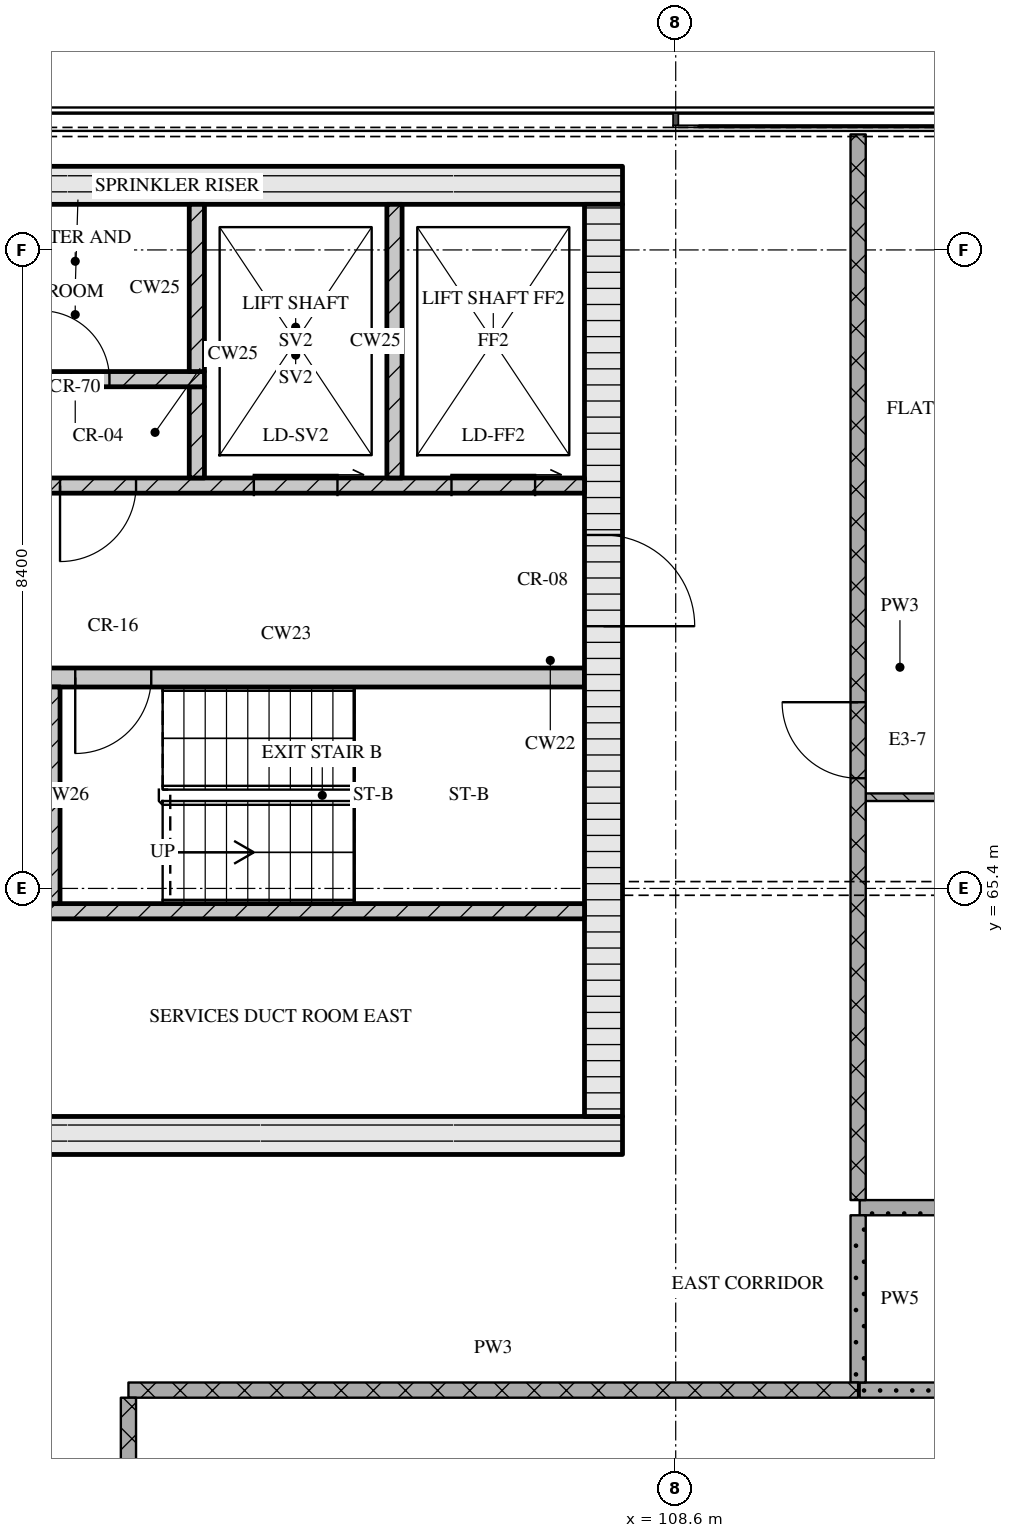
"""IFC4 building model, lengths in metres.
Left out: names, types, materials, properties, quantities, classifications, styles, units other than length and angle.
Written with IfcOpenShell. Run it as: python <this file> out.ifc"""

import sys

from ifc_helpers import new_model, si_unit, direction, frame, frame_2d, origin, place, context, subcontext, project, spatial, rectangle, extrude, element, fill, save


model = new_model("IFC4")
c1 = context("Model", 3, precision=1e-05, world=origin(), true_north=direction((0.0, 1.0)))
c2 = subcontext(c1, "Body", "Model", "MODEL_VIEW")
j1 = project(units=[si_unit("LENGTHUNIT", "METRE"), si_unit("PLANEANGLEUNIT", "RADIAN")], contexts=[c1])
p1 = place(None, origin())
s1 = spatial("IfcSite", under=j1, at=p1, CompositionType="ELEMENT")
p2 = place(p1, origin())
s2 = spatial("IfcBuilding", under=s1, at=p2, CompositionType="ELEMENT")
p3 = place(p2, frame((0.0, 0.0, 281.55)))
s3 = spatial("IfcBuildingStorey", under=s2, at=p3, CompositionType="ELEMENT", Elevation=281.55)
p4 = place(p3, frame((67.3, 62.15, 0.0), z_axis=(0.0, 0.0, 1.0), x_axis=(1.0, 0.0, 0.0)))
e1 = element("IfcWall", 1, at=p4, inside=s3, PredefinedType="SOLIDWALL", context=c2, shape_type="SweptSolid", body=[
    extrude(rectangle(XDim=40.6, YDim=0.5, at=frame_2d((20.3, 0.0))), origin(), (0.0, 0.0, 1.0), 3.32),
])
p5 = place(p4, frame((20.65, 0.0, 0.0)))
e2 = element("IfcOpeningElement", 2, at=p5, cuts=e1, PredefinedType="OPENING", context=c2, shape_type="SweptSolid", body=[
    extrude(rectangle(XDim=1.8, YDim=2.1, at=frame_2d((0.9, 1.05))), frame((0.0, 0.26, 0.0), z_axis=(0.0, -1.0, 0.0), x_axis=(1.0, 0.0, 0.0)), (0.0, 0.0, 1.0), 0.52),
])
p6 = place(p3, frame((67.3, 74.65, 0.0), z_axis=(0.0, 0.0, 1.0), x_axis=(1.0, 0.0, 0.0)))
e3 = element("IfcWall", 3, at=p6, inside=s3, PredefinedType="SOLIDWALL", context=c2, shape_type="SweptSolid", body=[
    extrude(rectangle(XDim=40.6, YDim=0.5, at=frame_2d((20.3, 0.0))), origin(), (0.0, 0.0, 1.0), 3.32),
])
p7 = place(p3, frame((107.65, 62.4, 0.0), z_axis=(0.0, 0.0, 1.0), x_axis=(0.0, 1.0, 0.0)))
e4 = element("IfcWall", 4, at=p7, inside=s3, PredefinedType="SOLIDWALL", context=c2, shape_type="SweptSolid", body=[
    extrude(rectangle(XDim=12.0, YDim=0.5, at=frame_2d((6.0, 0.0))), origin(), (0.0, 0.0, 1.0), 3.32),
])
p8 = place(p7, frame((6.45, 0.0, 0.0)))
e5 = element("IfcOpeningElement", 5, at=p8, cuts=e4, PredefinedType="OPENING", context=c2, shape_type="SweptSolid", body=[
    extrude(rectangle(XDim=1.2, YDim=2.1, at=frame_2d((0.6, 1.05))), frame((0.0, 0.26, 0.0), z_axis=(0.0, -1.0, 0.0), x_axis=(1.0, 0.0, 0.0)), (0.0, 0.0, 1.0), 0.52),
])
p9 = place(p3, frame((91.4, 65.1, 0.0), z_axis=(0.0, 0.0, 1.0), x_axis=(1.0, 0.0, 0.0)))
e6 = element("IfcWall", 6, at=p9, inside=s3, PredefinedType="SOLIDWALL", context=c2, shape_type="SweptSolid", body=[
    extrude(rectangle(XDim=16.0, YDim=0.2, at=frame_2d((8.0, 0.0))), origin(), (0.0, 0.0, 1.0), 3.32),
])
p10 = place(p9, frame((0.85, 0.0, 0.0)))
e7 = element("IfcOpeningElement", 7, at=p10, cuts=e6, PredefinedType="OPENING", context=c2, shape_type="SweptSolid", body=[
    extrude(rectangle(XDim=1.1, YDim=2.1, at=frame_2d((0.55, 1.05))), frame((0.0, 0.11, 0.0), z_axis=(0.0, -1.0, 0.0), x_axis=(1.0, 0.0, 0.0)), (0.0, 0.0, 1.0), 0.22),
])
p11 = place(p9, frame((3.35, 0.0, 0.0)))
e8 = element("IfcOpeningElement", 8, at=p11, cuts=e6, PredefinedType="OPENING", context=c2, shape_type="SweptSolid", body=[
    extrude(rectangle(XDim=1.1, YDim=2.1, at=frame_2d((0.55, 1.05))), frame((0.0, 0.11, 0.0), z_axis=(0.0, -1.0, 0.0), x_axis=(1.0, 0.0, 0.0)), (0.0, 0.0, 1.0), 0.22),
])
p12 = place(p9, frame((5.85, 0.0, 0.0)))
e9 = element("IfcOpeningElement", 9, at=p12, cuts=e6, PredefinedType="OPENING", context=c2, shape_type="SweptSolid", body=[
    extrude(rectangle(XDim=1.1, YDim=2.1, at=frame_2d((0.55, 1.05))), frame((0.0, 0.11, 0.0), z_axis=(0.0, -1.0, 0.0), x_axis=(1.0, 0.0, 0.0)), (0.0, 0.0, 1.0), 0.22),
])
p13 = place(p9, frame((7.83, 0.0, 0.0)))
e10 = element("IfcOpeningElement", 10, at=p13, cuts=e6, PredefinedType="OPENING", context=c2, shape_type="SweptSolid", body=[
    extrude(rectangle(XDim=0.9, YDim=2.1, at=frame_2d((0.45, 1.05))), frame((0.0, 0.11, 0.0), z_axis=(0.0, -1.0, 0.0), x_axis=(1.0, 0.0, 0.0)), (0.0, 0.0, 1.0), 0.22),
])
p14 = place(p3, frame((100.35, 65.2, 0.0), z_axis=(0.0, 0.0, 1.0), x_axis=(0.0, 1.0, 0.0)))
e11 = element("IfcWall", 11, at=p14, inside=s3, PredefinedType="SOLIDWALL", context=c2, shape_type="SweptSolid", body=[
    extrude(rectangle(XDim=2.85, YDim=0.3, at=frame_2d((1.425, 0.0))), origin(), (0.0, 0.0, 1.0), 3.32),
])
p15 = place(p3, frame((98.95, 68.175, 0.0), z_axis=(0.0, 0.0, 1.0), x_axis=(1.0, 0.0, 0.0)))
e12 = element("IfcWall", 12, at=p15, inside=s3, PredefinedType="SOLIDWALL", context=c2, shape_type="SweptSolid", body=[
    extrude(rectangle(XDim=8.45, YDim=0.25, at=frame_2d((4.225, 0.0))), origin(), (0.0, 0.0, 1.0), 3.32),
])
p16 = place(p15, frame((0.45, 0.0, 0.0)))
e13 = element("IfcOpeningElement", 13, at=p16, cuts=e12, PredefinedType="OPENING", context=c2, shape_type="SweptSolid", body=[
    extrude(rectangle(XDim=0.8, YDim=2.1, at=frame_2d((0.4, 1.05))), frame((0.0, 0.135, 0.0), z_axis=(0.0, -1.0, 0.0), x_axis=(1.0, 0.0, 0.0)), (0.0, 0.0, 1.0), 0.27),
])
p17 = place(p15, frame((1.75, 0.0, 0.0)))
e14 = element("IfcOpeningElement", 14, at=p17, cuts=e12, PredefinedType="OPENING", context=c2, shape_type="SweptSolid", body=[
    extrude(rectangle(XDim=1.0, YDim=2.1, at=frame_2d((0.5, 1.05))), frame((0.0, 0.135, 0.0), z_axis=(0.0, -1.0, 0.0), x_axis=(1.0, 0.0, 0.0)), (0.0, 0.0, 1.0), 0.27),
])
p18 = place(p3, frame((67.8, 70.7, 0.0), z_axis=(0.0, 0.0, 1.0), x_axis=(1.0, 0.0, 0.0)))
e15 = element("IfcWall", 15, at=p18, inside=s3, PredefinedType="SOLIDWALL", context=c2, shape_type="SweptSolid", body=[
    extrude(rectangle(XDim=39.6, YDim=0.2, at=frame_2d((19.8, 0.0))), origin(), (0.0, 0.0, 1.0), 3.32),
])
p19 = place(p18, frame((0.65, 0.0, 0.0)))
e16 = element("IfcOpeningElement", 16, at=p19, cuts=e15, PredefinedType="OPENING", context=c2, shape_type="SweptSolid", body=[
    extrude(rectangle(XDim=1.1, YDim=2.1, at=frame_2d((0.55, 1.05))), frame((0.0, 0.11, 0.0), z_axis=(0.0, -1.0, 0.0), x_axis=(1.0, 0.0, 0.0)), (0.0, 0.0, 1.0), 0.22),
])
p20 = place(p18, frame((3.25, 0.0, 0.0)))
e17 = element("IfcOpeningElement", 17, at=p20, cuts=e15, PredefinedType="OPENING", context=c2, shape_type="SweptSolid", body=[
    extrude(rectangle(XDim=1.1, YDim=2.1, at=frame_2d((0.55, 1.05))), frame((0.0, 0.11, 0.0), z_axis=(0.0, -1.0, 0.0), x_axis=(1.0, 0.0, 0.0)), (0.0, 0.0, 1.0), 0.22),
])
p21 = place(p18, frame((5.9, 0.0, 0.0)))
e18 = element("IfcOpeningElement", 18, at=p21, cuts=e15, PredefinedType="OPENING", context=c2, shape_type="SweptSolid", body=[
    extrude(rectangle(XDim=1.0, YDim=2.1, at=frame_2d((0.5, 1.05))), frame((0.0, 0.11, 0.0), z_axis=(0.0, -1.0, 0.0), x_axis=(1.0, 0.0, 0.0)), (0.0, 0.0, 1.0), 0.22),
])
p22 = place(p18, frame((21.7, 0.0, 0.0)))
e19 = element("IfcOpeningElement", 19, at=p22, cuts=e15, PredefinedType="OPENING", context=c2, shape_type="SweptSolid", body=[
    extrude(rectangle(XDim=1.0, YDim=2.1, at=frame_2d((0.5, 1.05))), frame((0.0, 0.11, 0.0), z_axis=(0.0, -1.0, 0.0), x_axis=(1.0, 0.0, 0.0)), (0.0, 0.0, 1.0), 0.22),
])
p23 = place(p18, frame((32.7, 0.0, 0.0)))
e20 = element("IfcOpeningElement", 20, at=p23, cuts=e15, PredefinedType="OPENING", context=c2, shape_type="SweptSolid", body=[
    extrude(rectangle(XDim=1.0, YDim=2.1, at=frame_2d((0.5, 1.05))), frame((0.0, 0.11, 0.0), z_axis=(0.0, -1.0, 0.0), x_axis=(1.0, 0.0, 0.0)), (0.0, 0.0, 1.0), 0.22),
])
p24 = place(p18, frame((35.25, 0.0, 0.0)))
e21 = element("IfcOpeningElement", 21, at=p24, cuts=e15, PredefinedType="OPENING", context=c2, shape_type="SweptSolid", body=[
    extrude(rectangle(XDim=1.1, YDim=2.1, at=frame_2d((0.55, 1.05))), frame((0.0, 0.11, 0.0), z_axis=(0.0, -1.0, 0.0), x_axis=(1.0, 0.0, 0.0)), (0.0, 0.0, 1.0), 0.22),
])
p25 = place(p18, frame((37.85, 0.0, 0.0)))
e22 = element("IfcOpeningElement", 22, at=p25, cuts=e15, PredefinedType="OPENING", context=c2, shape_type="SweptSolid", body=[
    extrude(rectangle(XDim=1.1, YDim=2.1, at=frame_2d((0.55, 1.05))), frame((0.0, 0.11, 0.0), z_axis=(0.0, -1.0, 0.0), x_axis=(1.0, 0.0, 0.0)), (0.0, 0.0, 1.0), 0.22),
])
p26 = place(p3, frame((102.3, 70.8, 0.0), z_axis=(0.0, 0.0, 1.0), x_axis=(0.0, 1.0, 0.0)))
e23 = element("IfcWall", 23, at=p26, inside=s3, PredefinedType="SOLIDWALL", context=c2, shape_type="SweptSolid", body=[
    extrude(rectangle(XDim=1.2, YDim=0.2, at=frame_2d((0.6, 0.0))), origin(), (0.0, 0.0, 1.0), 3.32),
])
p27 = place(p3, frame((104.9, 70.8, 0.0), z_axis=(0.0, 0.0, 1.0), x_axis=(0.0, 1.0, 0.0)))
e24 = element("IfcWall", 24, at=p27, inside=s3, PredefinedType="SOLIDWALL", context=c2, shape_type="SweptSolid", body=[
    extrude(rectangle(XDim=3.6, YDim=0.2, at=frame_2d((1.8, 0.0))), origin(), (0.0, 0.0, 1.0), 3.32),
])
p28 = place(p3, frame((95.08, 72.1, 0.0), z_axis=(0.0, 0.0, 1.0), x_axis=(1.0, 0.0, 0.0)))
e25 = element("IfcWall", 25, at=p28, inside=s3, PredefinedType="SOLIDWALL", context=c2, shape_type="SweptSolid", body=[
    extrude(rectangle(XDim=7.32, YDim=0.2, at=frame_2d((3.66, 0.0))), origin(), (0.0, 0.0, 1.0), 3.32),
])
p29 = place(p28, frame((0.52, 0.0, 0.0)))
e26 = element("IfcOpeningElement", 26, at=p29, cuts=e25, PredefinedType="OPENING", context=c2, shape_type="SweptSolid", body=[
    extrude(rectangle(XDim=0.9, YDim=2.1, at=frame_2d((0.45, 1.05))), frame((0.0, 0.11, 0.0), z_axis=(0.0, -1.0, 0.0), x_axis=(1.0, 0.0, 0.0)), (0.0, 0.0, 1.0), 0.22),
])
p30 = place(p28, frame((2.48, 0.0, 0.0)))
e27 = element("IfcOpeningElement", 27, at=p30, cuts=e25, PredefinedType="OPENING", context=c2, shape_type="SweptSolid", body=[
    extrude(rectangle(XDim=0.9, YDim=2.1, at=frame_2d((0.45, 1.05))), frame((0.0, 0.11, 0.0), z_axis=(0.0, -1.0, 0.0), x_axis=(1.0, 0.0, 0.0)), (0.0, 0.0, 1.0), 0.22),
])
p31 = place(p28, frame((5.17, 0.0, 0.0)))
e28 = element("IfcOpeningElement", 28, at=p31, cuts=e25, PredefinedType="OPENING", context=c2, shape_type="SweptSolid", body=[
    extrude(rectangle(XDim=0.9, YDim=2.1, at=frame_2d((0.45, 1.05))), frame((0.0, 0.11, 0.0), z_axis=(0.0, -1.0, 0.0), x_axis=(1.0, 0.0, 0.0)), (0.0, 0.0, 1.0), 0.22),
])
p32 = place(p3, frame((102.3, 72.2, 0.0), z_axis=(0.0, 0.0, 1.0), x_axis=(0.0, 1.0, 0.0)))
e29 = element("IfcWall", 29, at=p32, inside=s3, PredefinedType="SOLIDWALL", context=c2, shape_type="SweptSolid", body=[
    extrude(rectangle(XDim=2.2, YDim=0.2, at=frame_2d((1.1, 0.0))), origin(), (0.0, 0.0, 1.0), 3.32),
])
p33 = place(p3, frame((101.4, 58.8, 0.0), z_axis=(0.0, 0.0, 1.0), x_axis=(1.0, 0.0, 0.0)))
e30 = element("IfcWall", 30, at=p33, inside=s3, PredefinedType="PARTITIONING", context=c2, shape_type="SweptSolid", body=[
    extrude(rectangle(XDim=9.6, YDim=0.2, at=frame_2d((4.8, 0.0))), origin(), (0.0, 0.0, 1.0), 3.32),
])
p34 = place(p3, frame((111.02, 58.8, 0.0), z_axis=(0.0, 0.0, 1.0), x_axis=(1.0, 0.0, 0.0)))
e31 = element("IfcWall", 31, at=p34, inside=s3, PredefinedType="PARTITIONING", context=c2, shape_type="SweptSolid", body=[
    extrude(rectangle(XDim=7.48, YDim=0.2, at=frame_2d((3.74, 0.0))), origin(), (0.0, 0.0, 1.0), 3.32),
])
p35 = place(p3, frame((111.02, 61.2, 0.0), z_axis=(0.0, 0.0, 1.0), x_axis=(1.0, 0.0, 0.0)))
e32 = element("IfcWall", 32, at=p35, inside=s3, PredefinedType="PARTITIONING", context=c2, shape_type="SweptSolid", body=[
    extrude(rectangle(XDim=2.66, YDim=0.2, at=frame_2d((1.33, 0.0))), origin(), (0.0, 0.0, 1.0), 3.32),
])
p36 = place(p3, frame((111.1, 66.6, 0.0), z_axis=(0.0, 0.0, 1.0), x_axis=(1.0, 0.0, 0.0)))
e33 = element("IfcWall", 33, at=p36, inside=s3, PredefinedType="PARTITIONING", context=c2, shape_type="SweptSolid", body=[
    extrude(rectangle(XDim=2.6, YDim=0.1, at=frame_2d((1.3, 0.0))), origin(), (0.0, 0.0, 1.0), 3.32),
])
p37 = place(p3, frame((101.4, 58.7, 0.0), z_axis=(0.0, 0.0, 1.0), x_axis=(0.0, -1.0, 0.0)))
e34 = element("IfcWall", 34, at=p37, inside=s3, PredefinedType="PARTITIONING", context=c2, shape_type="SweptSolid", body=[
    extrude(rectangle(XDim=8.0, YDim=0.2, at=frame_2d((4.0, 0.0))), origin(), (0.0, 0.0, 1.0), 3.32),
])
p38 = place(p37, frame((2.85, 0.0, 0.0)))
e35 = element("IfcOpeningElement", 35, at=p38, cuts=e34, PredefinedType="OPENING", context=c2, shape_type="SweptSolid", body=[
    extrude(rectangle(XDim=1.0, YDim=2.1, at=frame_2d((0.5, 1.05))), frame((0.0, 0.11, 0.0), z_axis=(0.0, -1.0, 0.0), x_axis=(1.0, 0.0, 0.0)), (0.0, 0.0, 1.0), 0.22),
])
p39 = place(p3, frame((111.0, 75.32, 0.0), z_axis=(0.0, 0.0, 1.0), x_axis=(0.0, -1.0, 0.0)))
e36 = element("IfcWall", 36, at=p39, inside=s3, PredefinedType="PARTITIONING", context=c2, shape_type="SweptSolid", body=[
    extrude(rectangle(XDim=14.02, YDim=0.2, at=frame_2d((7.01, 0.0))), origin(), (0.0, 0.0, 1.0), 3.32),
])
p40 = place(p39, frame((7.47, 0.0, 0.0)))
e37 = element("IfcOpeningElement", 37, at=p40, cuts=e36, PredefinedType="OPENING", context=c2, shape_type="SweptSolid", body=[
    extrude(rectangle(XDim=1.0, YDim=2.1, at=frame_2d((0.5, 1.05))), frame((0.0, 0.11, 0.0), z_axis=(0.0, -1.0, 0.0), x_axis=(1.0, 0.0, 0.0)), (0.0, 0.0, 1.0), 0.22),
])
p41 = place(p3, frame((111.0, 61.1, 0.0), z_axis=(0.0, 0.0, 1.0), x_axis=(0.0, -1.0, 0.0)))
e38 = element("IfcWall", 38, at=p41, inside=s3, PredefinedType="PARTITIONING", context=c2, shape_type="SweptSolid", body=[
    extrude(rectangle(XDim=2.2, YDim=0.2, at=frame_2d((1.1, 0.0))), origin(), (0.0, 0.0, 1.0), 3.32),
])
p42 = place(p17, origin())
e39 = element("IfcDoor", 39, at=p42, inside=s3, OperationType="SINGLE_SWING_RIGHT", PredefinedType="DOOR", context=c2, shape_type="SweptSolid", body=[
    extrude(rectangle(XDim=1.0, YDim=2.1, at=frame_2d((0.5, 1.05))), frame((0.0, 0.025, 0.0), z_axis=(0.0, -1.0, 0.0), x_axis=(1.0, 0.0, 0.0)), (0.0, 0.0, 1.0), 0.05),
])
fill(e14, e39)
p43 = place(p8, origin())
e40 = element("IfcDoor", 40, at=p43, inside=s3, OperationType="SINGLE_SWING_RIGHT", PredefinedType="DOOR", context=c2, shape_type="SweptSolid", body=[
    extrude(rectangle(XDim=1.2, YDim=2.1, at=frame_2d((0.6, 1.05))), frame((0.0, 0.025, 0.0), z_axis=(0.0, -1.0, 0.0), x_axis=(1.0, 0.0, 0.0)), (0.0, 0.0, 1.0), 0.05),
])
fill(e5, e40)
p44 = place(p23, origin())
e41 = element("IfcDoor", 41, at=p44, inside=s3, OperationType="SINGLE_SWING_RIGHT", PredefinedType="DOOR", context=c2, shape_type="SweptSolid", body=[
    extrude(rectangle(XDim=1.0, YDim=2.1, at=frame_2d((0.5, 1.05))), frame((0.0, 0.025, 0.0), z_axis=(0.0, -1.0, 0.0), x_axis=(1.0, 0.0, 0.0)), (0.0, 0.0, 1.0), 0.05),
])
fill(e20, e41)
p45 = place(p24, origin())
e42 = element("IfcDoor", 42, at=p45, inside=s3, OperationType="SLIDING_TO_RIGHT", PredefinedType="DOOR", context=c2, shape_type="SweptSolid", body=[
    extrude(rectangle(XDim=1.1, YDim=2.1, at=frame_2d((0.55, 1.05))), frame((0.0, 0.025, 0.0), z_axis=(0.0, -1.0, 0.0), x_axis=(1.0, 0.0, 0.0)), (0.0, 0.0, 1.0), 0.05),
])
fill(e21, e42)
p46 = place(p25, origin())
e43 = element("IfcDoor", 43, at=p46, inside=s3, OperationType="SLIDING_TO_RIGHT", PredefinedType="DOOR", context=c2, shape_type="SweptSolid", body=[
    extrude(rectangle(XDim=1.1, YDim=2.1, at=frame_2d((0.55, 1.05))), frame((0.0, 0.025, 0.0), z_axis=(0.0, -1.0, 0.0), x_axis=(1.0, 0.0, 0.0)), (0.0, 0.0, 1.0), 0.05),
])
fill(e22, e43)
p47 = place(p31, origin())
e44 = element("IfcDoor", 44, at=p47, inside=s3, OperationType="SINGLE_SWING_LEFT", PredefinedType="DOOR", context=c2, shape_type="SweptSolid", body=[
    extrude(rectangle(XDim=0.9, YDim=2.1, at=frame_2d((0.45, 1.05))), frame((0.0, 0.025, 0.0), z_axis=(0.0, -1.0, 0.0), x_axis=(1.0, 0.0, 0.0)), (0.0, 0.0, 1.0), 0.05),
])
fill(e28, e44)
p48 = place(p40, origin())
e45 = element("IfcDoor", 45, at=p48, inside=s3, OperationType="SINGLE_SWING_RIGHT", PredefinedType="DOOR", context=c2, shape_type="SweptSolid", body=[
    extrude(rectangle(XDim=1.0, YDim=2.1, at=frame_2d((0.5, 1.05))), frame((0.0, 0.025, 0.0), z_axis=(0.0, -1.0, 0.0), x_axis=(1.0, 0.0, 0.0)), (0.0, 0.0, 1.0), 0.05),
])
fill(e37, e45)
save(model, sys.argv[1])
